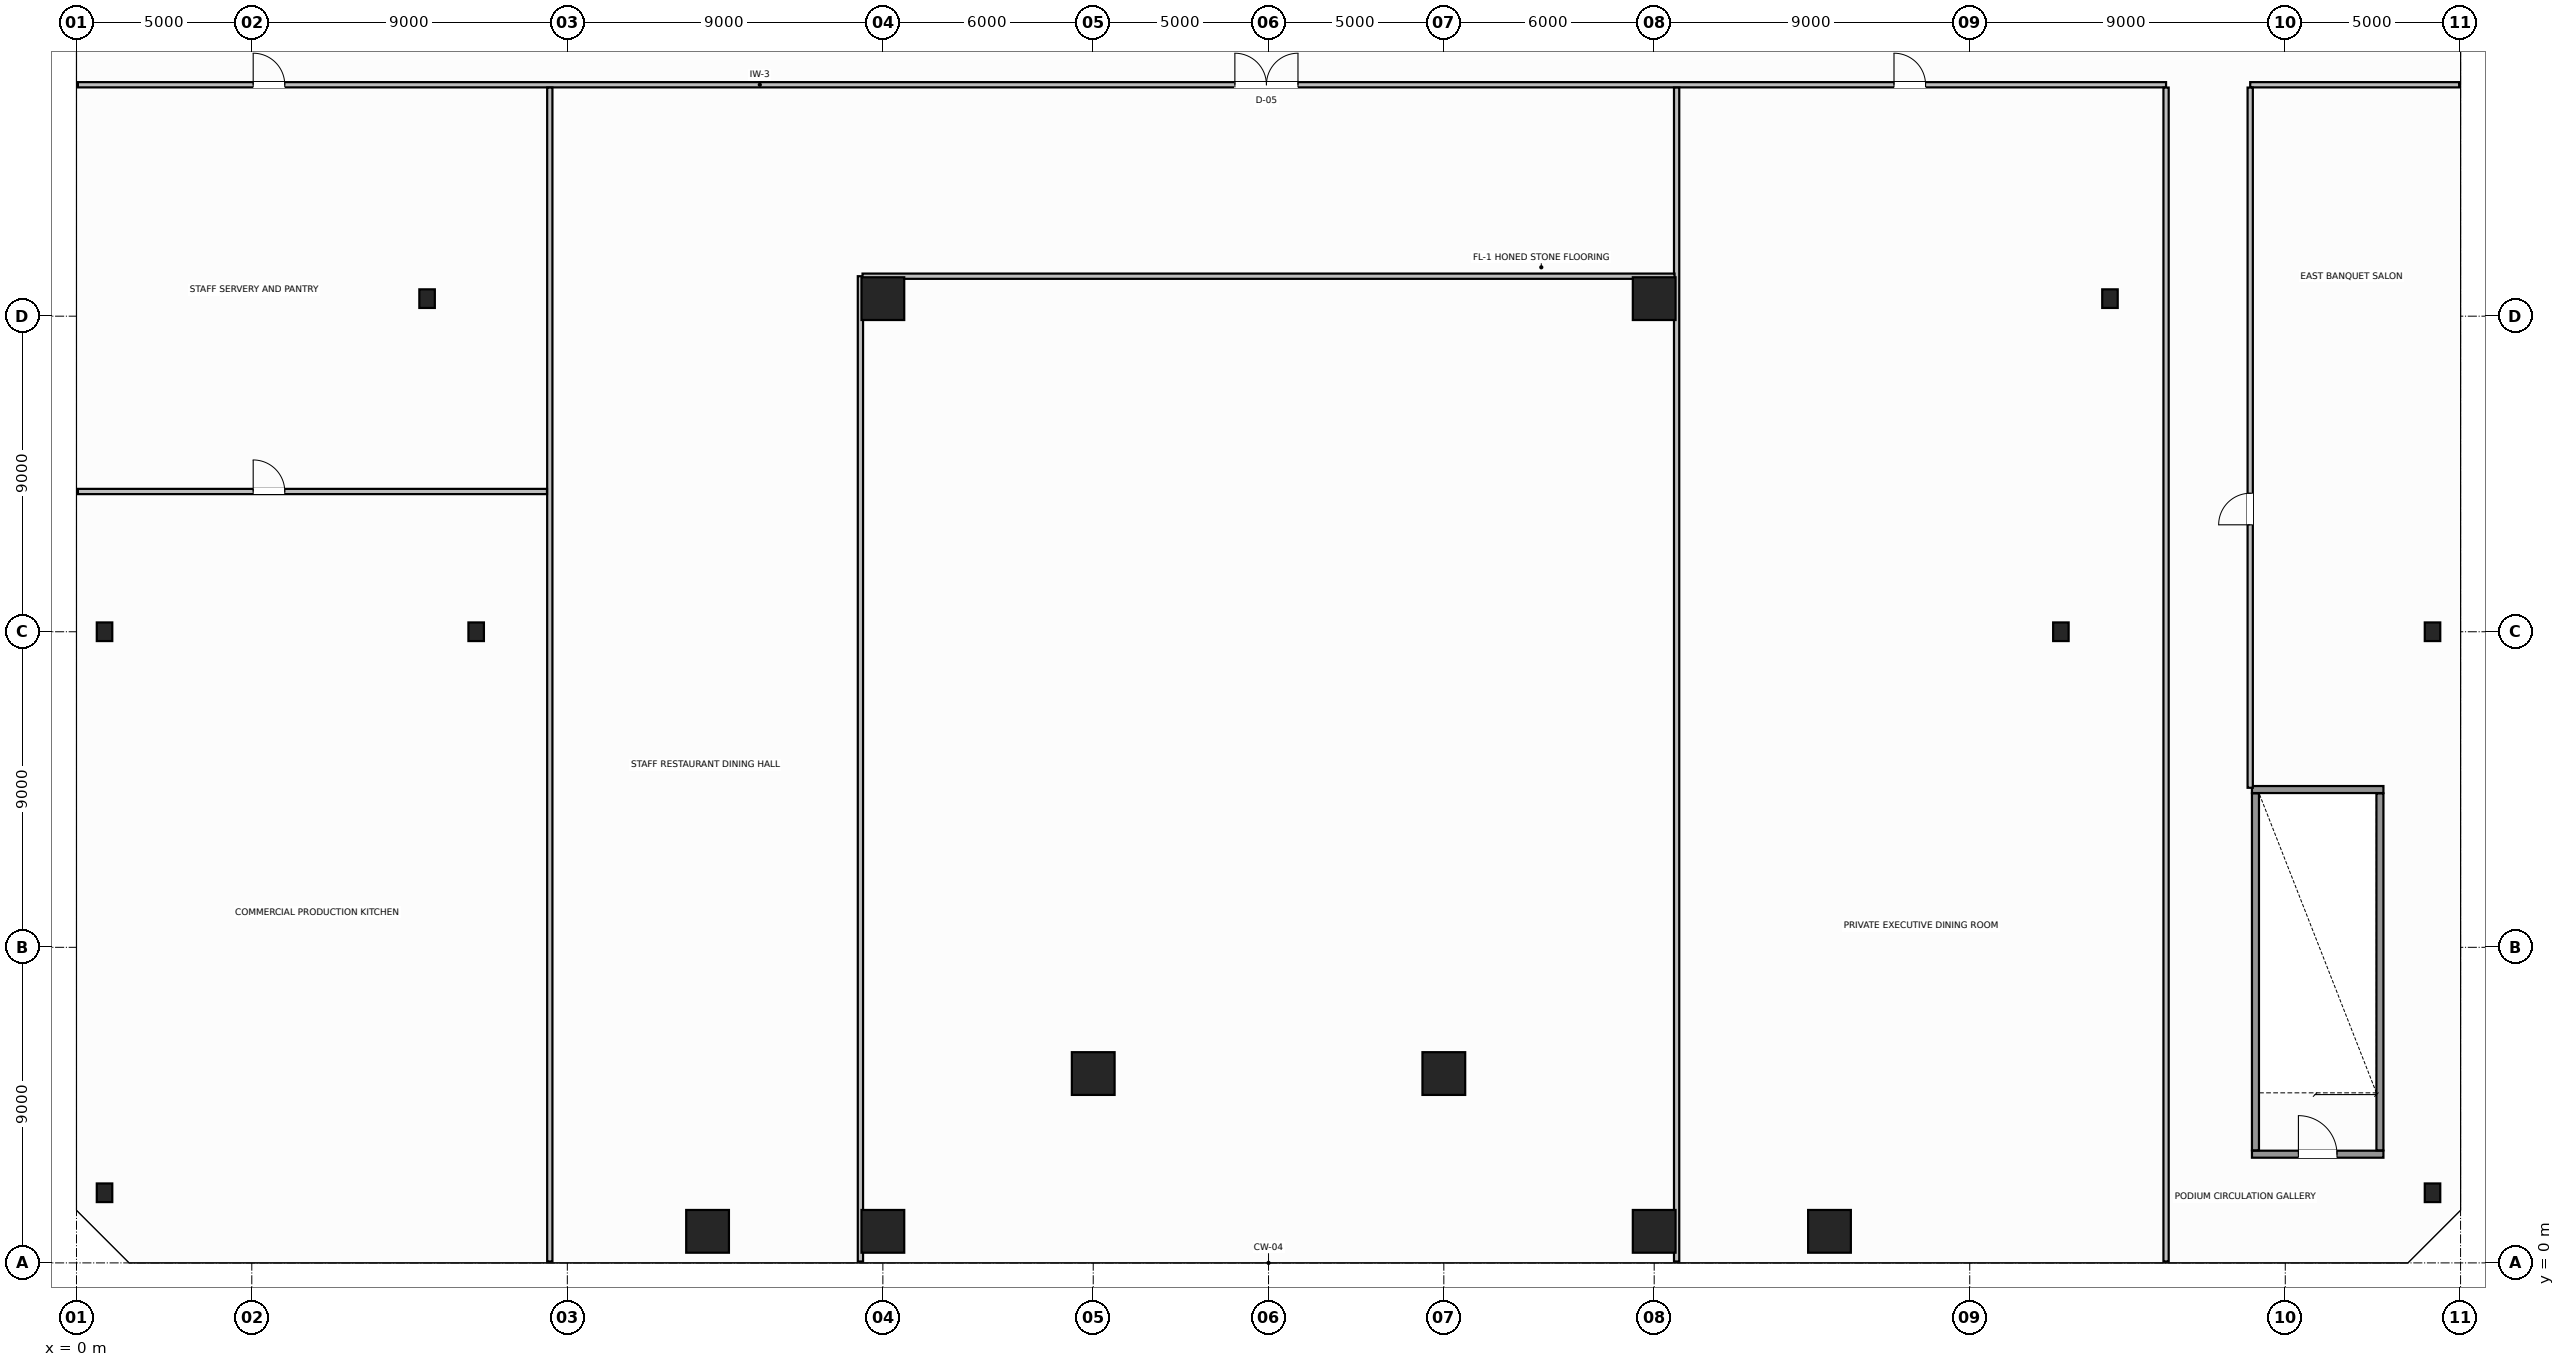
"""IFC4 building model, lengths in metres.
Left out: names, types, materials, properties, quantities, classifications, styles, units other than length and angle.
Written with IfcOpenShell. Run it as: python <this file> out.ifc"""

import sys

from ifc_helpers import new_model, si_unit, direction, frame, frame_2d, origin, origin_2d, place, context, subcontext, project, spatial, rectangle, hollow_circle, i_section, extrude, source, transform, mapped, element, fill, save


model = new_model("IFC4")
c1 = context("Model", 3, precision=1e-05, world=origin(), true_north=direction((0.0, 1.0)))
c2 = subcontext(c1, "Body", "Model", "MODEL_VIEW")
j1 = project(units=[si_unit("LENGTHUNIT", "METRE"), si_unit("PLANEANGLEUNIT", "RADIAN")], contexts=[c1])
p1 = place(None, origin())
s1 = spatial("IfcSite", under=j1, at=p1, CompositionType="ELEMENT")
p2 = place(p1, origin())
s2 = spatial("IfcBuilding", under=s1, at=p2, CompositionType="ELEMENT")
p3 = place(p2, frame((0.0, 0.0, 14.4)))
s3 = spatial("IfcBuildingStorey", under=s2, at=p3, CompositionType="ELEMENT", Elevation=14.4)
m1 = source(origin(), c2, "Body", "SweptSolid", [
    extrude(hollow_circle(Radius=0.61, WallThickness=0.05, at=origin_2d()), origin(), (0.0, 0.0, 1.0), 4.4),
])
for number, where, z_axis, x_axis in (
    (1, (18.0, 0.9, 0.0), (0.0, 0.0, 1.0), (1.0, 0.0, 0.0)),
    (2, (23.0, 0.9, 0.0), (0.0, 0.0, 1.0), (1.0, 0.0, 0.0)),
    (3, (29.0, 5.4, 0.0), (0.0, 0.0, 1.0), (1.0, 0.0, 0.0)),
    (4, (39.0, 5.4, 0.0), (0.0, 0.0, 1.0), (1.0, 0.0, 0.0)),
    (5, (45.0, 0.9, 0.0), (0.0, 0.0, 1.0), (1.0, 0.0, 0.0)),
    (6, (50.0, 0.9, 0.0), (0.0, 0.0, 1.0), (1.0, 0.0, 0.0)),
):
    element("IfcColumn", number, at=place(p3, frame(where, z_axis=z_axis, x_axis=x_axis)), inside=s3, PredefinedType="COLUMN", context=c2, shape_type="MappedRepresentation", body=[
        mapped(m1, transform((0.0, 0.0, 0.0), scale=1.0)),
    ])
m2 = source(origin(), c2, "Body", "SweptSolid", [
    extrude(i_section(OverallWidth=0.442, OverallDepth=0.531, WebThickness=0.065, FlangeThickness=0.076, FilletRadius=0.015, at=origin_2d()), origin(), (0.0, 0.0, 1.0), 4.4),
])
for number, where, z_axis, x_axis in (
    (7, (0.8, 2.0, 0.0), (0.0, 0.0, 1.0), (1.0, 0.0, 0.0)),
    (8, (0.8, 18.0, 0.0), (0.0, 0.0, 1.0), (1.0, 0.0, 0.0)),
    (9, (67.2, 2.0, 0.0), (0.0, 0.0, 1.0), (1.0, 0.0, 0.0)),
    (10, (67.2, 18.0, 0.0), (0.0, 0.0, 1.0), (1.0, 0.0, 0.0)),
    (11, (10.0, 27.5, 0.0), (0.0, 0.0, 1.0), (1.0, 0.0, 0.0)),
    (12, (11.4, 18.0, 0.0), (0.0, 0.0, 1.0), (1.0, 0.0, 0.0)),
    (13, (58.0, 27.5, 0.0), (0.0, 0.0, 1.0), (1.0, 0.0, 0.0)),
    (14, (56.6, 18.0, 0.0), (0.0, 0.0, 1.0), (1.0, 0.0, 0.0)),
):
    element("IfcColumn", number, at=place(p3, frame(where, z_axis=z_axis, x_axis=x_axis)), inside=s3, PredefinedType="COLUMN", context=c2, shape_type="MappedRepresentation", body=[
        mapped(m2, transform((0.0, 0.0, 0.0), scale=1.0)),
    ])
for number, where, z_axis, x_axis in (
    (15, (23.0, 27.5, 0.0), (0.0, 0.0, 1.0), (1.0, 0.0, 0.0)),
    (16, (45.0, 27.5, 0.0), (0.0, 0.0, 1.0), (1.0, 0.0, 0.0)),
):
    element("IfcColumn", number, at=place(p3, frame(where, z_axis=z_axis, x_axis=x_axis)), inside=s3, PredefinedType="COLUMN", context=c2, shape_type="MappedRepresentation", body=[
        mapped(m1, transform((0.0, 0.0, 0.0), scale=1.0)),
    ])
p4 = place(p3, frame((62.05, 3.1, 0.0), z_axis=(0.0, 0.0, 1.0), x_axis=(1.0, 0.0, 0.0)))
e17 = element("IfcWall", 17, at=p4, inside=s3, PredefinedType="SOLIDWALL", context=c2, shape_type="SweptSolid", body=[
    extrude(rectangle(XDim=3.75, YDim=0.2, at=frame_2d((1.875, 0.0))), origin(), (0.0, 0.0, 1.0), 4.4),
])
p5 = place(p4, frame((1.325, 0.0, 0.0)))
e18 = element("IfcOpeningElement", 18, at=p5, cuts=e17, PredefinedType="OPENING", context=c2, shape_type="SweptSolid", body=[
    extrude(rectangle(XDim=1.1, YDim=2.15, at=frame_2d((0.55, 1.075))), frame((0.0, 0.11, 0.0), z_axis=(0.0, -1.0, 0.0), x_axis=(1.0, 0.0, 0.0)), (0.0, 0.0, 1.0), 0.22),
])
p6 = place(p3, frame((62.05, 13.5, 0.0), z_axis=(0.0, 0.0, 1.0), x_axis=(1.0, 0.0, 0.0)))
e19 = element("IfcWall", 19, at=p6, inside=s3, PredefinedType="SOLIDWALL", context=c2, shape_type="SweptSolid", body=[
    extrude(rectangle(XDim=3.75, YDim=0.2, at=frame_2d((1.875, 0.0))), origin(), (0.0, 0.0, 1.0), 4.4),
])
for number, where, z_axis, x_axis in (
    (20, (62.15, 3.21, 0.0), (0.0, 0.0, 1.0), (0.0, 1.0, 0.0)),
    (21, (65.7, 3.21, 0.0), (0.0, 0.0, 1.0), (0.0, 1.0, 0.0)),
):
    element("IfcWall", number, at=place(p3, frame(where, z_axis=z_axis, x_axis=x_axis)), inside=s3, PredefinedType="SOLIDWALL", context=c2, shape_type="SweptSolid", body=[
        extrude(rectangle(XDim=10.18, YDim=0.2, at=frame_2d((5.09, 0.0))), origin(), (0.0, 0.0, 1.0), 4.4),
    ])
p7 = place(p3, frame((0.04, 33.6, 0.0), z_axis=(0.0, 0.0, 1.0), x_axis=(1.0, 0.0, 0.0)))
e22 = element("IfcWall", 22, at=p7, inside=s3, PredefinedType="PARTITIONING", context=c2, shape_type="SweptSolid", body=[
    extrude(rectangle(XDim=59.56, YDim=0.15, at=frame_2d((29.78, 0.0))), origin(), (0.0, 0.0, 1.0), 4.12),
])
p8 = place(p7, frame((5.0, 0.0, 0.0)))
e23 = element("IfcOpeningElement", 23, at=p8, cuts=e22, PredefinedType="OPENING", context=c2, shape_type="SweptSolid", body=[
    extrude(rectangle(XDim=0.9, YDim=2.15, at=frame_2d((0.45, 1.075))), frame((0.0, 0.085, 0.0), z_axis=(0.0, -1.0, 0.0), x_axis=(1.0, 0.0, 0.0)), (0.0, 0.0, 1.0), 0.17),
])
p9 = place(p7, frame((33.0, 0.0, 0.0)))
e24 = element("IfcOpeningElement", 24, at=p9, cuts=e22, PredefinedType="OPENING", context=c2, shape_type="SweptSolid", body=[
    extrude(rectangle(XDim=1.8, YDim=2.25, at=frame_2d((0.9, 1.125))), frame((0.0, 0.085, 0.0), z_axis=(0.0, -1.0, 0.0), x_axis=(1.0, 0.0, 0.0)), (0.0, 0.0, 1.0), 0.17),
])
p10 = place(p7, frame((51.8, 0.0, 0.0)))
e25 = element("IfcOpeningElement", 25, at=p10, cuts=e22, PredefinedType="OPENING", context=c2, shape_type="SweptSolid", body=[
    extrude(rectangle(XDim=0.9, YDim=2.15, at=frame_2d((0.45, 1.075))), frame((0.0, 0.085, 0.0), z_axis=(0.0, -1.0, 0.0), x_axis=(1.0, 0.0, 0.0)), (0.0, 0.0, 1.0), 0.17),
])
p11 = place(p3, frame((62.0, 33.6, 0.0), z_axis=(0.0, 0.0, 1.0), x_axis=(1.0, 0.0, 0.0)))
e26 = element("IfcWall", 26, at=p11, inside=s3, PredefinedType="PARTITIONING", context=c2, shape_type="SweptSolid", body=[
    extrude(rectangle(XDim=5.96, YDim=0.15, at=frame_2d((2.98, 0.0))), origin(), (0.0, 0.0, 1.0), 4.12),
])
p12 = place(p3, frame((59.6, 0.04, 0.0), z_axis=(0.0, 0.0, 1.0), x_axis=(0.0, 1.0, 0.0)))
e27 = element("IfcWall", 27, at=p12, inside=s3, PredefinedType="PARTITIONING", context=c2, shape_type="SweptSolid", body=[
    extrude(rectangle(XDim=33.48, YDim=0.15, at=frame_2d((16.74, 0.0))), origin(), (0.0, 0.0, 1.0), 2.91),
])
p13 = place(p3, frame((62.0, 13.55, 0.0), z_axis=(0.0, 0.0, 1.0), x_axis=(0.0, 1.0, 0.0)))
e28 = element("IfcWall", 28, at=p13, inside=s3, PredefinedType="PARTITIONING", context=c2, shape_type="SweptSolid", body=[
    extrude(rectangle(XDim=19.97, YDim=0.15, at=frame_2d((9.985, 0.0))), origin(), (0.0, 0.0, 1.0), 4.12),
])
p14 = place(p13, frame((7.5, 0.0, 0.0)))
e29 = element("IfcOpeningElement", 29, at=p14, cuts=e28, PredefinedType="OPENING", context=c2, shape_type="SweptSolid", body=[
    extrude(rectangle(XDim=0.9, YDim=2.15, at=frame_2d((0.45, 1.075))), frame((0.0, 0.085, 0.0), z_axis=(0.0, -1.0, 0.0), x_axis=(1.0, 0.0, 0.0)), (0.0, 0.0, 1.0), 0.17),
])
p15 = place(p3, frame((13.5, 0.04, 0.0), z_axis=(0.0, 0.0, 1.0), x_axis=(0.0, 1.0, 0.0)))
e30 = element("IfcWall", 30, at=p15, inside=s3, PredefinedType="PARTITIONING", context=c2, shape_type="SweptSolid", body=[
    extrude(rectangle(XDim=33.48, YDim=0.15, at=frame_2d((16.74, 0.0))), origin(), (0.0, 0.0, 1.0), 2.91),
])
p16 = place(p3, frame((0.04, 22.0, 0.0), z_axis=(0.0, 0.0, 1.0), x_axis=(1.0, 0.0, 0.0)))
e31 = element("IfcWall", 31, at=p16, inside=s3, PredefinedType="PARTITIONING", context=c2, shape_type="SweptSolid", body=[
    extrude(rectangle(XDim=13.38, YDim=0.15, at=frame_2d((6.69, 0.0))), origin(), (0.0, 0.0, 1.0), 4.12),
])
p17 = place(p16, frame((5.0, 0.0, 0.0)))
e32 = element("IfcOpeningElement", 32, at=p17, cuts=e31, PredefinedType="OPENING", context=c2, shape_type="SweptSolid", body=[
    extrude(rectangle(XDim=0.9, YDim=2.15, at=frame_2d((0.45, 1.075))), frame((0.0, 0.085, 0.0), z_axis=(0.0, -1.0, 0.0), x_axis=(1.0, 0.0, 0.0)), (0.0, 0.0, 1.0), 0.17),
])
p18 = place(p3, frame((22.36, 0.04, 0.0), z_axis=(0.0, 0.0, 1.0), x_axis=(0.0, 1.0, 0.0)))
e33 = element("IfcWall", 33, at=p18, inside=s3, PredefinedType="PARTITIONING", context=c2, shape_type="SweptSolid", body=[
    extrude(rectangle(XDim=28.1, YDim=0.15, at=frame_2d((14.05, 0.0))), origin(), (0.0, 0.0, 1.0), 4.12),
])
p19 = place(p3, frame((45.64, 0.04, 0.0), z_axis=(0.0, 0.0, 1.0), x_axis=(0.0, 1.0, 0.0)))
e34 = element("IfcWall", 34, at=p19, inside=s3, PredefinedType="PARTITIONING", context=c2, shape_type="SweptSolid", body=[
    extrude(rectangle(XDim=33.48, YDim=0.15, at=frame_2d((16.74, 0.0))), origin(), (0.0, 0.0, 1.0), 4.12),
])
p20 = place(p3, frame((22.42, 28.14, 0.0), z_axis=(0.0, 0.0, 1.0), x_axis=(1.0, 0.0, 0.0)))
e35 = element("IfcWall", 35, at=p20, inside=s3, PredefinedType="PARTITIONING", context=c2, shape_type="SweptSolid", body=[
    extrude(rectangle(XDim=23.16, YDim=0.15, at=frame_2d((11.58, 0.0))), origin(), (0.0, 0.0, 1.0), 4.12),
])
m3 = source(origin(), c2, "Body", "SweptSolid", [
    extrude(rectangle(XDim=1.1, YDim=2.15, at=frame_2d((0.55, 1.075))), frame((0.0, 0.025, 0.0), z_axis=(0.0, -1.0, 0.0), x_axis=(1.0, 0.0, 0.0)), (0.0, 0.0, 1.0), 0.05),
])
p21 = place(p5, origin())
e36 = element("IfcDoor", 36, at=p21, inside=s3, OperationType="SINGLE_SWING_RIGHT", PredefinedType="DOOR", context=c2, shape_type="MappedRepresentation", body=[
    mapped(m3, transform((0.0, 0.0, 0.0), scale=1.0)),
])
fill(e18, e36)
m4 = source(origin(), c2, "Body", "SweptSolid", [
    extrude(rectangle(XDim=0.9, YDim=2.15, at=frame_2d((0.45, 1.075))), frame((0.0, 0.025, 0.0), z_axis=(0.0, -1.0, 0.0), x_axis=(1.0, 0.0, 0.0)), (0.0, 0.0, 1.0), 0.05),
])
p22 = place(p8, origin())
e37 = element("IfcDoor", 37, at=p22, inside=s3, OperationType="SINGLE_SWING_LEFT", PredefinedType="DOOR", context=c2, shape_type="MappedRepresentation", body=[
    mapped(m4, transform((0.0, 0.0, 0.0), scale=1.0)),
])
fill(e23, e37)
p23 = place(p17, origin())
e38 = element("IfcDoor", 38, at=p23, inside=s3, OperationType="SINGLE_SWING_RIGHT", PredefinedType="DOOR", context=c2, shape_type="MappedRepresentation", body=[
    mapped(m4, transform((0.0, 0.0, 0.0), scale=1.0)),
])
fill(e32, e38)
m5 = source(origin(), c2, "Body", "SweptSolid", [
    extrude(rectangle(XDim=1.8, YDim=2.25, at=frame_2d((0.9, 1.125))), frame((0.0, 0.025, 0.0), z_axis=(0.0, -1.0, 0.0), x_axis=(1.0, 0.0, 0.0)), (0.0, 0.0, 1.0), 0.05),
])
p24 = place(p9, origin())
e39 = element("IfcDoor", 39, at=p24, inside=s3, OperationType="DOUBLE_DOOR_SINGLE_SWING", PredefinedType="DOOR", context=c2, shape_type="MappedRepresentation", body=[
    mapped(m5, transform((0.0, 0.0, 0.0), scale=1.0)),
])
fill(e24, e39)
p25 = place(p10, origin())
e40 = element("IfcDoor", 40, at=p25, inside=s3, OperationType="SINGLE_SWING_RIGHT", PredefinedType="DOOR", context=c2, shape_type="MappedRepresentation", body=[
    mapped(m4, transform((0.0, 0.0, 0.0), scale=1.0)),
])
fill(e25, e40)
p26 = place(p14, origin())
e41 = element("IfcDoor", 41, at=p26, inside=s3, OperationType="SINGLE_SWING_LEFT", PredefinedType="DOOR", context=c2, shape_type="MappedRepresentation", body=[
    mapped(m4, transform((0.0, 0.0, 0.0), scale=1.0)),
])
fill(e29, e41)
save(model, sys.argv[1])
